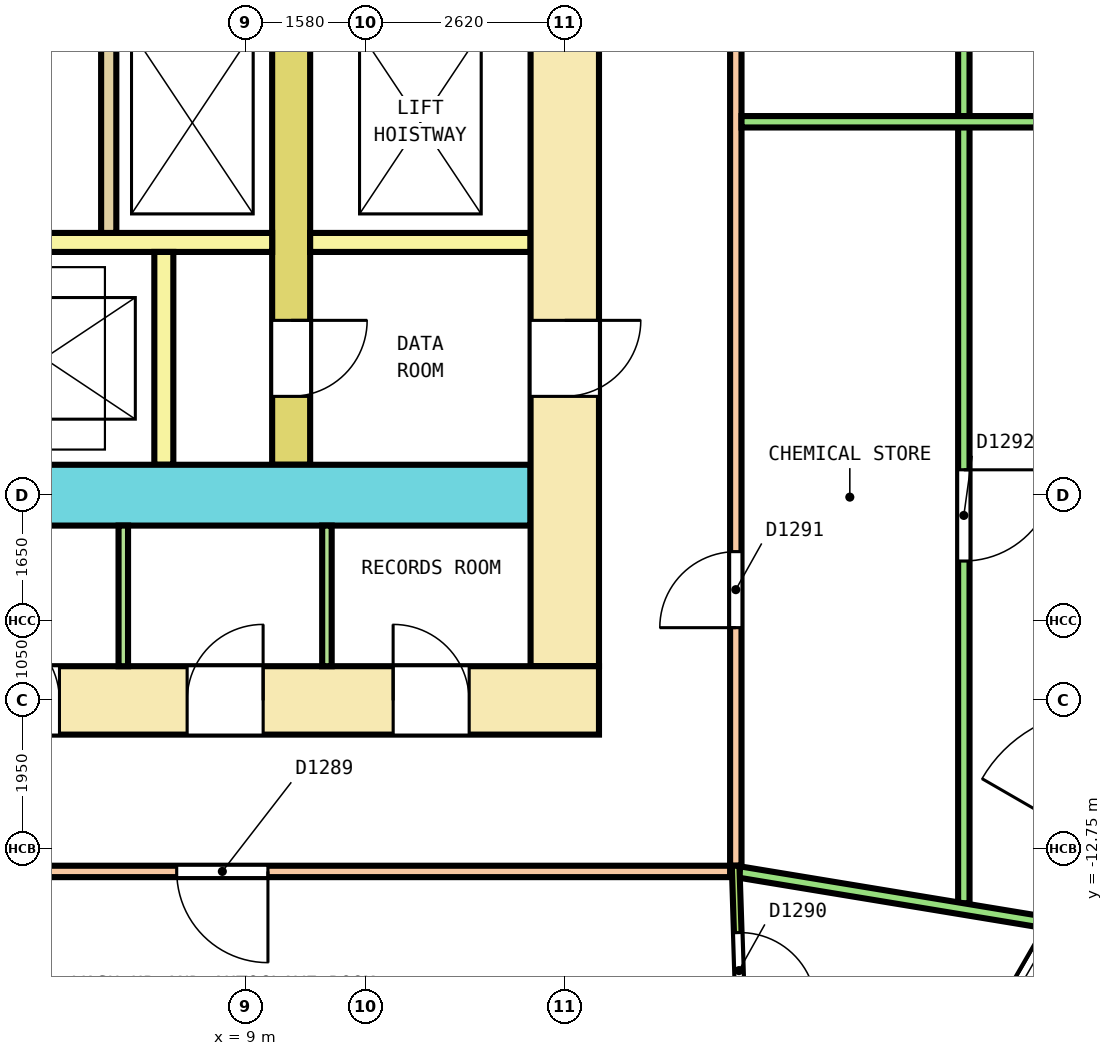
"""IFC4 building model, lengths in metres.
Left out: names, types, materials, properties, quantities, classifications, styles, units other than length and angle.
Written with IfcOpenShell. Run it as: python <this file> out.ifc"""

import sys

from ifc_helpers import new_model, si_unit, direction, frame, frame_2d, origin, place, context, subcontext, project, spatial, polyline, rectangle, outline, extrude, element, fill, save


model = new_model("IFC4")
c1 = context("Model", 3, precision=1e-05, world=origin(), true_north=direction((0.0, 1.0)))
c2 = subcontext(c1, "Body", "Model", "MODEL_VIEW")
j1 = project(units=[si_unit("LENGTHUNIT", "METRE"), si_unit("PLANEANGLEUNIT", "RADIAN")], contexts=[c1])
p1 = place(None, origin())
s1 = spatial("IfcSite", under=j1, at=p1, CompositionType="ELEMENT")
p2 = place(p1, origin())
s2 = spatial("IfcBuilding", under=s1, at=p2, CompositionType="ELEMENT")
p3 = place(p2, frame((0.0, 0.0, 23.4)))
s3 = spatial("IfcBuildingStorey", under=s2, at=p3, CompositionType="ELEMENT", Elevation=23.4)
p4 = place(p3, frame((15.624, -20.739, 0.0), z_axis=(0.0, 0.0, 1.0), x_axis=(0.500001833672, 0.866024345111, 0.0)))
e1 = element("IfcWall", 1, at=p4, inside=s3, PredefinedType="SOLIDWALL", context=c2, shape_type="SweptSolid", body=[
    extrude(outline(polyline([(-0.027, -0.1), (0.991, -0.1), (2.008, -0.1), (3.026, -0.1), (4.043, -0.1), (5.061, -0.1), (6.079, -0.1), (7.096, -0.1), (8.114, -0.1), (9.131, -0.1), (10.149, -0.1), (11.167, -0.1), (12.184, -0.1), (13.202, -0.1), (14.219, -0.1), (15.237, -0.1), (16.254, -0.1), (17.272, -0.1), (18.29, -0.1), (19.307, -0.1), (20.325, -0.1), (20.271, 0.1), (19.259, 0.1), (18.247, 0.1), (17.234, 0.1), (16.222, 0.1), (15.21, 0.1), (14.198, 0.1), (13.186, 0.1), (12.173, 0.1), (11.161, 0.1), (10.149, 0.1), (9.137, 0.1), (8.125, 0.1), (7.112, 0.1), (6.1, 0.1), (5.088, 0.1), (4.076, 0.1), (3.063, 0.1), (2.051, 0.1), (1.039, 0.1), (0.027, 0.1), (-0.027, -0.1)])), origin(), (0.0, 0.0, 1.0), 4.1),
])
p5 = place(p4, frame((0.38, 0.0, 0.1)))
e2 = element("IfcOpeningElement", 2, at=p5, cuts=e1, PredefinedType="OPENING", context=c2, shape_type="SweptSolid", body=[
    extrude(rectangle(XDim=3.3, YDim=2.9, at=frame_2d((1.65, 1.45))), frame((0.0, 0.11, 0.0), z_axis=(0.0, -1.0, 0.0), x_axis=(1.0, 0.0, 0.0)), (0.0, 0.0, 1.0), 0.22),
])
p6 = place(p4, frame((4.439, 0.0, 0.1)))
e3 = element("IfcOpeningElement", 3, at=p6, cuts=e1, PredefinedType="OPENING", context=c2, shape_type="SweptSolid", body=[
    extrude(rectangle(XDim=3.3, YDim=2.9, at=frame_2d((1.65, 1.45))), frame((0.0, 0.11, 0.0), z_axis=(0.0, -1.0, 0.0), x_axis=(1.0, 0.0, 0.0)), (0.0, 0.0, 1.0), 0.22),
])
p7 = place(p4, frame((9.249, 0.0, 0.0)))
e4 = element("IfcOpeningElement", 4, at=p7, cuts=e1, PredefinedType="OPENING", context=c2, shape_type="SweptSolid", body=[
    extrude(rectangle(XDim=1.8, YDim=2.4, at=frame_2d((0.9, 1.2))), frame((0.0, 0.11, 0.0), z_axis=(0.0, -1.0, 0.0), x_axis=(1.0, 0.0, 0.0)), (0.0, 0.0, 1.0), 0.22),
])
p8 = place(p4, frame((9.249, 0.0, 2.55)))
e5 = element("IfcOpeningElement", 5, at=p8, cuts=e1, PredefinedType="OPENING", context=c2, shape_type="SweptSolid", body=[
    extrude(rectangle(XDim=1.8, YDim=0.45, at=frame_2d((0.9, 0.225))), frame((0.0, 0.11, 0.0), z_axis=(0.0, -1.0, 0.0), x_axis=(1.0, 0.0, 0.0)), (0.0, 0.0, 1.0), 0.22),
])
p9 = place(p4, frame((12.559, 0.0, 0.1)))
e6 = element("IfcOpeningElement", 6, at=p9, cuts=e1, PredefinedType="OPENING", context=c2, shape_type="SweptSolid", body=[
    extrude(rectangle(XDim=3.3, YDim=2.9, at=frame_2d((1.65, 1.45))), frame((0.0, 0.11, 0.0), z_axis=(0.0, -1.0, 0.0), x_axis=(1.0, 0.0, 0.0)), (0.0, 0.0, 1.0), 0.22),
])
p10 = place(p4, frame((16.618, 0.0, 0.1)))
e7 = element("IfcOpeningElement", 7, at=p10, cuts=e1, PredefinedType="OPENING", context=c2, shape_type="SweptSolid", body=[
    extrude(rectangle(XDim=3.3, YDim=2.9, at=frame_2d((1.65, 1.45))), frame((0.0, 0.11, 0.0), z_axis=(0.0, -1.0, 0.0), x_axis=(1.0, 0.0, 0.0)), (0.0, 0.0, 1.0), 0.22),
])
p11 = place(p3, frame((-13.65, -10.8, 0.0), z_axis=(0.0, 0.0, 1.0), x_axis=(1.0, 0.0, 0.0)))
e8 = element("IfcWall", 8, at=p11, inside=s3, PredefinedType="SHEAR", context=c2, shape_type="SweptSolid", body=[
    extrude(rectangle(XDim=27.3, YDim=0.9, at=frame_2d((13.65, 0.0))), origin(), (0.0, 0.0, 1.0), 4.1),
])
p12 = place(p11, frame((2.425, 0.0, 0.0)))
e9 = element("IfcOpeningElement", 9, at=p12, cuts=e8, PredefinedType="OPENING", context=c2, shape_type="SweptSolid", body=[
    extrude(rectangle(XDim=1.0, YDim=2.1, at=frame_2d((0.5, 1.05))), frame((0.0, 0.46, 0.0), z_axis=(0.0, -1.0, 0.0), x_axis=(1.0, 0.0, 0.0)), (0.0, 0.0, 1.0), 0.92),
])
p13 = place(p11, frame((6.569, 0.0, 0.0)))
e10 = element("IfcOpeningElement", 10, at=p13, cuts=e8, PredefinedType="OPENING", context=c2, shape_type="SweptSolid", body=[
    extrude(rectangle(XDim=1.0, YDim=2.1, at=frame_2d((0.5, 1.05))), frame((0.0, 0.46, 0.0), z_axis=(0.0, -1.0, 0.0), x_axis=(1.0, 0.0, 0.0)), (0.0, 0.0, 1.0), 0.92),
])
p14 = place(p11, frame((10.681, 0.0, 0.0)))
e11 = element("IfcOpeningElement", 11, at=p14, cuts=e8, PredefinedType="OPENING", context=c2, shape_type="SweptSolid", body=[
    extrude(rectangle(XDim=1.0, YDim=2.1, at=frame_2d((0.5, 1.05))), frame((0.0, 0.46, 0.0), z_axis=(0.0, -1.0, 0.0), x_axis=(1.0, 0.0, 0.0)), (0.0, 0.0, 1.0), 0.92),
])
p15 = place(p11, frame((19.202, 0.0, 0.0)))
e12 = element("IfcOpeningElement", 12, at=p15, cuts=e8, PredefinedType="OPENING", context=c2, shape_type="SweptSolid", body=[
    extrude(rectangle(XDim=1.0, YDim=2.1, at=frame_2d((0.5, 1.05))), frame((0.0, 0.46, 0.0), z_axis=(0.0, -1.0, 0.0), x_axis=(1.0, 0.0, 0.0)), (0.0, 0.0, 1.0), 0.92),
])
p16 = place(p11, frame((21.881, 0.0, 0.0)))
e13 = element("IfcOpeningElement", 13, at=p16, cuts=e8, PredefinedType="OPENING", context=c2, shape_type="SweptSolid", body=[
    extrude(rectangle(XDim=1.0, YDim=2.1, at=frame_2d((0.5, 1.05))), frame((0.0, 0.46, 0.0), z_axis=(0.0, -1.0, 0.0), x_axis=(1.0, 0.0, 0.0)), (0.0, 0.0, 1.0), 0.92),
])
p17 = place(p11, frame((24.592, 0.0, 0.0)))
e14 = element("IfcOpeningElement", 14, at=p17, cuts=e8, PredefinedType="OPENING", context=c2, shape_type="SweptSolid", body=[
    extrude(rectangle(XDim=1.0, YDim=2.1, at=frame_2d((0.5, 1.05))), frame((0.0, 0.46, 0.0), z_axis=(0.0, -1.0, 0.0), x_axis=(1.0, 0.0, 0.0)), (0.0, 0.0, 1.0), 0.92),
])
p18 = place(p11, frame((15.2, 0.0, 0.0)))
e15 = element("IfcOpeningElement", 15, at=p18, cuts=e8, PredefinedType="OPENING", context=c2, shape_type="SweptSolid", body=[
    extrude(rectangle(XDim=1.2, YDim=2.1, at=frame_2d((0.6, 1.05))), frame((0.0, 0.46, 0.0), z_axis=(0.0, -1.0, 0.0), x_axis=(1.0, 0.0, 0.0)), (0.0, 0.0, 1.0), 0.92),
])
p19 = place(p3, frame((13.2, -10.35, 0.0), z_axis=(0.0, 0.0, 1.0), x_axis=(0.0, 1.0, 0.0)))
e16 = element("IfcWall", 16, at=p19, inside=s3, PredefinedType="SHEAR", context=c2, shape_type="SweptSolid", body=[
    extrude(rectangle(XDim=20.7, YDim=0.9, at=frame_2d((10.35, 0.0))), origin(), (0.0, 0.0, 1.0), 4.1),
])
p20 = place(p19, frame((9.15, 0.0, 0.0)))
e17 = element("IfcOpeningElement", 17, at=p20, cuts=e16, PredefinedType="OPENING", context=c2, shape_type="SweptSolid", body=[
    extrude(rectangle(XDim=2.4, YDim=2.1, at=frame_2d((1.2, 1.05))), frame((0.0, 0.46, 0.0), z_axis=(0.0, -1.0, 0.0), x_axis=(1.0, 0.0, 0.0)), (0.0, 0.0, 1.0), 0.92),
])
p21 = place(p19, frame((16.05, 0.0, 0.0)))
e18 = element("IfcOpeningElement", 18, at=p21, cuts=e16, PredefinedType="OPENING", context=c2, shape_type="SweptSolid", body=[
    extrude(rectangle(XDim=1.2, YDim=2.1, at=frame_2d((0.6, 1.05))), frame((0.0, 0.46, 0.0), z_axis=(0.0, -1.0, 0.0), x_axis=(1.0, 0.0, 0.0)), (0.0, 0.0, 1.0), 0.92),
])
p22 = place(p19, frame((3.55, 0.0, 0.0)))
e19 = element("IfcOpeningElement", 19, at=p22, cuts=e16, PredefinedType="OPENING", context=c2, shape_type="SweptSolid", body=[
    extrude(rectangle(XDim=1.0, YDim=2.1, at=frame_2d((0.5, 1.05))), frame((0.0, 0.46, 0.0), z_axis=(0.0, -1.0, 0.0), x_axis=(1.0, 0.0, 0.0)), (0.0, 0.0, 1.0), 0.92),
])
p23 = place(p3, frame((-12.75, -8.1, 0.0), z_axis=(0.0, 0.0, 1.0), x_axis=(1.0, 0.0, 0.0)))
e20 = element("IfcWall", 20, at=p23, inside=s3, PredefinedType="SHEAR", context=c2, shape_type="SweptSolid", body=[
    extrude(rectangle(XDim=25.5, YDim=0.8, at=frame_2d((12.75, 0.0))), origin(), (0.0, 0.0, 1.0), 4.1),
])
p24 = place(p23, frame((14.3, 0.0, 0.0)))
e21 = element("IfcOpeningElement", 21, at=p24, cuts=e20, PredefinedType="OPENING", context=c2, shape_type="SweptSolid", body=[
    extrude(rectangle(XDim=1.2, YDim=2.1, at=frame_2d((0.6, 1.05))), frame((0.0, 0.41, 0.0), z_axis=(0.0, -1.0, 0.0), x_axis=(1.0, 0.0, 0.0)), (0.0, 0.0, 1.0), 0.82),
])
p25 = place(p3, frame((9.6, -7.7, 0.0), z_axis=(0.0, 0.0, 1.0), x_axis=(0.0, 1.0, 0.0)))
e22 = element("IfcWall", 22, at=p25, inside=s3, PredefinedType="SHEAR", context=c2, shape_type="SweptSolid", body=[
    extrude(rectangle(XDim=15.4, YDim=0.5, at=frame_2d((7.7, 0.0))), origin(), (0.0, 0.0, 1.0), 4.1),
])
p26 = place(p25, frame((6.5, 0.0, 0.0)))
e23 = element("IfcOpeningElement", 23, at=p26, cuts=e22, PredefinedType="OPENING", context=c2, shape_type="SweptSolid", body=[
    extrude(rectangle(XDim=2.4, YDim=2.1, at=frame_2d((1.2, 1.05))), frame((0.0, 0.26, 0.0), z_axis=(0.0, -1.0, 0.0), x_axis=(1.0, 0.0, 0.0)), (0.0, 0.0, 1.0), 0.52),
])
p27 = place(p25, frame((13.4, 0.0, 0.0)))
e24 = element("IfcOpeningElement", 24, at=p27, cuts=e22, PredefinedType="OPENING", context=c2, shape_type="SweptSolid", body=[
    extrude(rectangle(XDim=1.2, YDim=2.1, at=frame_2d((0.6, 1.05))), frame((0.0, 0.26, 0.0), z_axis=(0.0, -1.0, 0.0), x_axis=(1.0, 0.0, 0.0)), (0.0, 0.0, 1.0), 0.52),
])
p28 = place(p25, frame((0.9, 0.0, 0.0)))
e25 = element("IfcOpeningElement", 25, at=p28, cuts=e22, PredefinedType="OPENING", context=c2, shape_type="SweptSolid", body=[
    extrude(rectangle(XDim=1.0, YDim=2.1, at=frame_2d((0.5, 1.05))), frame((0.0, 0.26, 0.0), z_axis=(0.0, -1.0, 0.0), x_axis=(1.0, 0.0, 0.0)), (0.0, 0.0, 1.0), 0.52),
])
p29 = place(p3, frame((-9.35, -4.775, 0.0), z_axis=(0.0, 0.0, 1.0), x_axis=(1.0, 0.0, 0.0)))
e26 = element("IfcWall", 26, at=p29, inside=s3, PredefinedType="SOLIDWALL", context=c2, shape_type="SweptSolid", body=[
    extrude(rectangle(XDim=18.7, YDim=0.25, at=frame_2d((9.35, 0.0))), origin(), (0.0, 0.0, 1.0), 4.1),
])
p30 = place(p3, frame((9.85, -4.775, 0.0), z_axis=(0.0, 0.0, 1.0), x_axis=(1.0, 0.0, 0.0)))
e27 = element("IfcWall", 27, at=p30, inside=s3, PredefinedType="SOLIDWALL", context=c2, shape_type="SweptSolid", body=[
    extrude(rectangle(XDim=2.9, YDim=0.25, at=frame_2d((1.45, 0.0))), origin(), (0.0, 0.0, 1.0), 4.1),
])
p31 = place(p3, frame((7.2, -4.65, 0.0), z_axis=(0.0, 0.0, 1.0), x_axis=(0.0, 1.0, 0.0)))
e28 = element("IfcWall", 28, at=p31, inside=s3, PredefinedType="SOLIDWALL", context=c2, shape_type="SweptSolid", body=[
    extrude(rectangle(XDim=2.9, YDim=0.2, at=frame_2d((1.45, 0.0))), origin(), (0.0, 0.0, 1.0), 4.1),
])
p32 = place(p3, frame((7.925, -7.7, 0.0), z_axis=(0.0, 0.0, 1.0), x_axis=(0.0, 1.0, 0.0)))
e29 = element("IfcWall", 29, at=p32, inside=s3, PredefinedType="SOLIDWALL", context=c2, shape_type="SweptSolid", body=[
    extrude(rectangle(XDim=2.8, YDim=0.25, at=frame_2d((1.4, 0.0))), origin(), (0.0, 0.0, 1.0), 4.1),
])
for number, where, z_axis, x_axis in (
    (30, (7.392, -10.35, 0.0), (0.0, 0.0, 1.0), (0.0, 1.0, 0.0)),
    (31, (10.071, -10.35, 0.0), (0.0, 0.0, 1.0), (0.0, 1.0, 0.0)),
):
    element("IfcWall", number, at=place(p3, frame(where, z_axis=z_axis, x_axis=x_axis)), inside=s3, PredefinedType="PARTITIONING", context=c2, shape_type="SweptSolid", body=[
        extrude(rectangle(XDim=1.85, YDim=0.125, at=frame_2d((0.925, 0.0))), origin(), (0.0, 0.0, 1.0), 4.1),
    ])
p33 = place(p3, frame((15.45, -12.975, 0.0), z_axis=(0.0, 0.0, 1.0), x_axis=(0.0, 1.0, 0.0)))
e32 = element("IfcWall", 32, at=p33, inside=s3, PredefinedType="PARTITIONING", context=c2, shape_type="SweptSolid", body=[
    extrude(rectangle(XDim=25.95, YDim=0.15, at=frame_2d((12.975, 0.0))), origin(), (0.0, 0.0, 1.0), 3.05),
])
p34 = place(p33, frame((13.124, 0.0, 0.0)))
e33 = element("IfcOpeningElement", 33, at=p34, cuts=e32, PredefinedType="OPENING", context=c2, shape_type="SweptSolid", body=[
    extrude(rectangle(XDim=1.0, YDim=2.1, at=frame_2d((0.5, 1.05))), frame((0.0, 0.085, 0.0), z_axis=(0.0, -1.0, 0.0), x_axis=(1.0, 0.0, 0.0)), (0.0, 0.0, 1.0), 0.17),
])
p35 = place(p33, frame((24.229, 0.0, 0.0)))
e34 = element("IfcOpeningElement", 34, at=p35, cuts=e32, PredefinedType="OPENING", context=c2, shape_type="SweptSolid", body=[
    extrude(rectangle(XDim=1.0, YDim=2.1, at=frame_2d((0.5, 1.05))), frame((0.0, 0.085, 0.0), z_axis=(0.0, -1.0, 0.0), x_axis=(1.0, 0.0, 0.0)), (0.0, 0.0, 1.0), 0.17),
])
p36 = place(p33, frame((3.132, 0.0, 0.0)))
e35 = element("IfcOpeningElement", 35, at=p36, cuts=e32, PredefinedType="OPENING", context=c2, shape_type="SweptSolid", body=[
    extrude(rectangle(XDim=1.0, YDim=2.1, at=frame_2d((0.5, 1.05))), frame((0.0, 0.085, 0.0), z_axis=(0.0, -1.0, 0.0), x_axis=(1.0, 0.0, 0.0)), (0.0, 0.0, 1.0), 0.17),
])
p37 = place(p3, frame((-15.375, -13.05, 0.0), z_axis=(0.0, 0.0, 1.0), x_axis=(1.0, 0.0, 0.0)))
e36 = element("IfcWall", 36, at=p37, inside=s3, PredefinedType="PARTITIONING", context=c2, shape_type="SweptSolid", body=[
    extrude(rectangle(XDim=30.75, YDim=0.15, at=frame_2d((15.375, 0.0))), origin(), (0.0, 0.0, 1.0), 3.05),
])
p38 = place(p37, frame((2.91, 0.0, 0.0)))
e37 = element("IfcOpeningElement", 37, at=p38, cuts=e36, PredefinedType="OPENING", context=c2, shape_type="SweptSolid", body=[
    extrude(rectangle(XDim=1.0, YDim=2.1, at=frame_2d((0.5, 1.05))), frame((0.0, 0.085, 0.0), z_axis=(0.0, -1.0, 0.0), x_axis=(1.0, 0.0, 0.0)), (0.0, 0.0, 1.0), 0.17),
])
p39 = place(p37, frame((13.33, 0.0, 0.0)))
e38 = element("IfcOpeningElement", 38, at=p39, cuts=e36, PredefinedType="OPENING", context=c2, shape_type="SweptSolid", body=[
    extrude(rectangle(XDim=1.2, YDim=2.1, at=frame_2d((0.6, 1.05))), frame((0.0, 0.085, 0.0), z_axis=(0.0, -1.0, 0.0), x_axis=(1.0, 0.0, 0.0)), (0.0, 0.0, 1.0), 0.17),
])
p40 = place(p37, frame((23.47, 0.0, 0.0)))
e39 = element("IfcOpeningElement", 39, at=p40, cuts=e36, PredefinedType="OPENING", context=c2, shape_type="SweptSolid", body=[
    extrude(rectangle(XDim=1.2, YDim=2.1, at=frame_2d((0.6, 1.05))), frame((0.0, 0.085, 0.0), z_axis=(0.0, -1.0, 0.0), x_axis=(1.0, 0.0, 0.0)), (0.0, 0.0, 1.0), 0.17),
])
p41 = place(p3, frame((18.45, -13.47, 0.0), z_axis=(0.0, 0.0, 1.0), x_axis=(0.0, 1.0, 0.0)))
e40 = element("IfcWall", 40, at=p41, inside=s3, PredefinedType="PARTITIONING", context=c2, shape_type="SweptSolid", body=[
    extrude(rectangle(XDim=29.445, YDim=0.15, at=frame_2d((14.723, 0.0))), origin(), (0.0, 0.0, 1.0), 3.05),
])
p42 = place(p41, frame((19.442, 0.0, 0.0)))
e41 = element("IfcOpeningElement", 41, at=p42, cuts=e40, PredefinedType="OPENING", context=c2, shape_type="SweptSolid", body=[
    extrude(rectangle(XDim=1.2, YDim=2.1, at=frame_2d((0.6, 1.05))), frame((0.0, 0.085, 0.0), z_axis=(0.0, -1.0, 0.0), x_axis=(1.0, 0.0, 0.0)), (0.0, 0.0, 1.0), 0.17),
])
p43 = place(p41, frame((25.641, 0.0, 0.0)))
e42 = element("IfcOpeningElement", 42, at=p43, cuts=e40, PredefinedType="OPENING", context=c2, shape_type="SweptSolid", body=[
    extrude(rectangle(XDim=1.0, YDim=2.1, at=frame_2d((0.5, 1.05))), frame((0.0, 0.085, 0.0), z_axis=(0.0, -1.0, 0.0), x_axis=(1.0, 0.0, 0.0)), (0.0, 0.0, 1.0), 0.17),
])
p44 = place(p41, frame((4.504, 0.0, 0.0)))
e43 = element("IfcOpeningElement", 43, at=p44, cuts=e40, PredefinedType="OPENING", context=c2, shape_type="SweptSolid", body=[
    extrude(rectangle(XDim=1.2, YDim=2.1, at=frame_2d((0.6, 1.05))), frame((0.0, 0.085, 0.0), z_axis=(0.0, -1.0, 0.0), x_axis=(1.0, 0.0, 0.0)), (0.0, 0.0, 1.0), 0.17),
])
p45 = place(p3, frame((15.525, -3.188, 0.0), z_axis=(0.0, 0.0, 1.0), x_axis=(1.0, 0.0, 0.0)))
e44 = element("IfcWall", 44, at=p45, inside=s3, PredefinedType="PARTITIONING", context=c2, shape_type="SweptSolid", body=[
    extrude(rectangle(XDim=10.117, YDim=0.15, at=frame_2d((5.058, 0.0))), origin(), (0.0, 0.0, 1.0), 3.05),
])
p46 = place(p3, frame((15.499, -13.058, 0.0), z_axis=(0.0, 0.0, 1.0), x_axis=(0.986647891311, -0.162867856163, 0.0)))
e45 = element("IfcWall", 45, at=p46, inside=s3, PredefinedType="PARTITIONING", context=c2, shape_type="SweptSolid", body=[
    extrude(rectangle(XDim=4.112, YDim=0.15, at=frame_2d((2.056, 0.0))), origin(), (0.0, 0.0, 1.0), 3.05),
])
p47 = place(p3, frame((15.448, -12.975, 0.0), z_axis=(0.0, 0.0, 1.0), x_axis=(0.031761985657, -0.999495460854, 0.0)))
e46 = element("IfcWall", 46, at=p47, inside=s3, PredefinedType="PARTITIONING", context=c2, shape_type="SweptSolid", body=[
    extrude(rectangle(XDim=3.152, YDim=0.1, at=frame_2d((1.576, 0.0))), origin(), (0.0, 0.0, 1.0), 3.05),
])
p48 = place(p47, frame((0.881, 0.0, 0.0)))
e47 = element("IfcOpeningElement", 47, at=p48, cuts=e46, PredefinedType="OPENING", context=c2, shape_type="SweptSolid", body=[
    extrude(rectangle(XDim=1.0, YDim=2.1, at=frame_2d((0.5, 1.05))), frame((0.0, 0.06, 0.0), z_axis=(0.0, -1.0, 0.0), x_axis=(1.0, 0.0, 0.0)), (0.0, 0.0, 1.0), 0.12),
])
p49 = place(p6, origin())
e48 = element("IfcWindow", 48, at=p49, inside=s3, PartitioningType="SINGLE_PANEL", PredefinedType="WINDOW", context=c2, shape_type="SweptSolid", body=[
    extrude(rectangle(XDim=3.3, YDim=2.9, at=frame_2d((1.65, 1.45))), frame((0.0, 0.03, 0.0), z_axis=(0.0, -1.0, 0.0), x_axis=(1.0, 0.0, 0.0)), (0.0, 0.0, 1.0), 0.06),
])
fill(e3, e48)
p50 = place(p28, origin())
e49 = element("IfcDoor", 49, at=p50, inside=s3, OperationType="SINGLE_SWING_LEFT", PredefinedType="DOOR", context=c2, shape_type="SweptSolid", body=[
    extrude(rectangle(XDim=1.0, YDim=2.1, at=frame_2d((0.5, 1.05))), frame((0.0, 0.2, 0.0), z_axis=(0.0, -1.0, 0.0), x_axis=(1.0, 0.0, 0.0)), (0.0, 0.0, 1.0), 0.4),
])
fill(e25, e49)
p51 = place(p22, origin())
e50 = element("IfcDoor", 50, at=p51, inside=s3, OperationType="SINGLE_SWING_RIGHT", PredefinedType="DOOR", context=c2, shape_type="SweptSolid", body=[
    extrude(rectangle(XDim=1.0, YDim=2.1, at=frame_2d((0.5, 1.05))), frame((0.0, 0.3, 0.0), z_axis=(0.0, -1.0, 0.0), x_axis=(1.0, 0.0, 0.0)), (0.0, 0.0, 1.0), 0.6),
])
fill(e19, e50)
p52 = place(p15, origin())
e51 = element("IfcDoor", 51, at=p52, inside=s3, OperationType="SINGLE_SWING_RIGHT", PredefinedType="DOOR", context=c2, shape_type="SweptSolid", body=[
    extrude(rectangle(XDim=1.0, YDim=2.1, at=frame_2d((0.5, 1.05))), frame((0.0, 0.3, 0.0), z_axis=(0.0, -1.0, 0.0), x_axis=(1.0, 0.0, 0.0)), (0.0, 0.0, 1.0), 0.6),
])
fill(e12, e51)
p53 = place(p16, origin())
e52 = element("IfcDoor", 52, at=p53, inside=s3, OperationType="SINGLE_SWING_LEFT", PredefinedType="DOOR", context=c2, shape_type="SweptSolid", body=[
    extrude(rectangle(XDim=1.0, YDim=2.1, at=frame_2d((0.5, 1.05))), frame((0.0, 0.3, 0.0), z_axis=(0.0, -1.0, 0.0), x_axis=(1.0, 0.0, 0.0)), (0.0, 0.0, 1.0), 0.6),
])
fill(e13, e52)
p54 = place(p17, origin())
e53 = element("IfcDoor", 53, at=p54, inside=s3, OperationType="SINGLE_SWING_RIGHT", PredefinedType="DOOR", context=c2, shape_type="SweptSolid", body=[
    extrude(rectangle(XDim=1.0, YDim=2.1, at=frame_2d((0.5, 1.05))), frame((0.0, 0.3, 0.0), z_axis=(0.0, -1.0, 0.0), x_axis=(1.0, 0.0, 0.0)), (0.0, 0.0, 1.0), 0.6),
])
fill(e14, e53)
p55 = place(p40, origin())
e54 = element("IfcDoor", 54, at=p55, inside=s3, OperationType="DOUBLE_DOOR_SINGLE_SWING", PredefinedType="DOOR", context=c2, shape_type="SweptSolid", body=[
    extrude(rectangle(XDim=1.2, YDim=2.1, at=frame_2d((0.6, 1.05))), frame((0.0, 0.025, 0.0), z_axis=(0.0, -1.0, 0.0), x_axis=(1.0, 0.0, 0.0)), (0.0, 0.0, 1.0), 0.05),
])
fill(e39, e54)
p56 = place(p48, origin())
e55 = element("IfcDoor", 55, at=p56, inside=s3, OperationType="SINGLE_SWING_LEFT", PredefinedType="DOOR", context=c2, shape_type="SweptSolid", body=[
    extrude(rectangle(XDim=1.0, YDim=2.1, at=frame_2d((0.5, 1.05))), frame((0.0, 0.025, 0.0), z_axis=(0.0, -1.0, 0.0), x_axis=(1.0, 0.0, 0.0)), (0.0, 0.0, 1.0), 0.05),
])
fill(e47, e55)
p57 = place(p36, origin())
e56 = element("IfcDoor", 56, at=p57, inside=s3, OperationType="SINGLE_SWING_RIGHT", PredefinedType="DOOR", context=c2, shape_type="SweptSolid", body=[
    extrude(rectangle(XDim=1.0, YDim=2.1, at=frame_2d((0.5, 1.05))), frame((0.0, 0.025, 0.0), z_axis=(0.0, -1.0, 0.0), x_axis=(1.0, 0.0, 0.0)), (0.0, 0.0, 1.0), 0.05),
])
fill(e35, e56)
p58 = place(p44, origin())
e57 = element("IfcDoor", 57, at=p58, inside=s3, OperationType="DOUBLE_DOOR_SINGLE_SWING", PredefinedType="DOOR", context=c2, shape_type="SweptSolid", body=[
    extrude(rectangle(XDim=1.2, YDim=2.1, at=frame_2d((0.6, 1.05))), frame((0.0, 0.025, 0.0), z_axis=(0.0, -1.0, 0.0), x_axis=(1.0, 0.0, 0.0)), (0.0, 0.0, 1.0), 0.05),
])
fill(e43, e57)
save(model, sys.argv[1])
